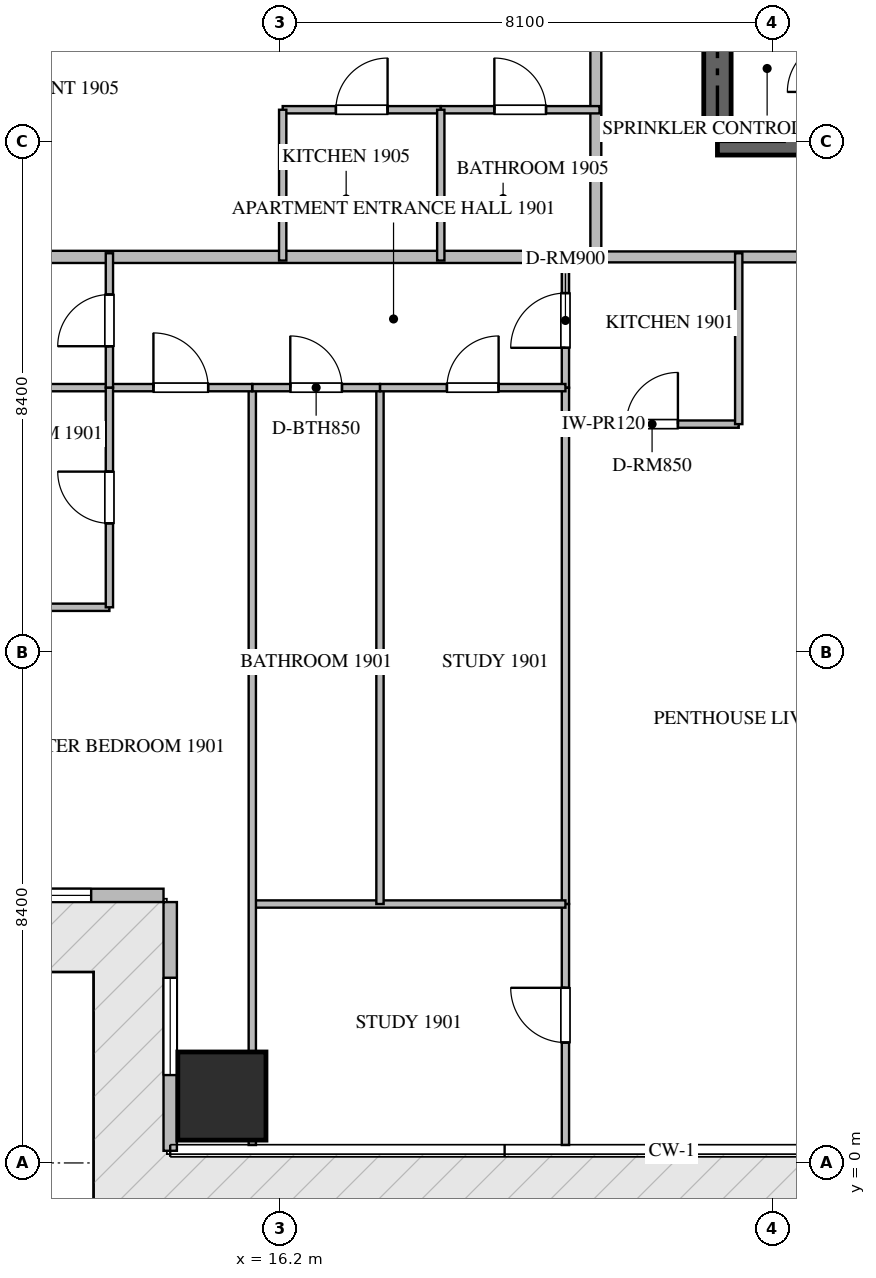
"""IFC4 building model, lengths in metres.
Left out: names, types, materials, properties, quantities, classifications, styles, units other than length and angle.
Written with IfcOpenShell. Run it as: python <this file> out.ifc"""

import sys

from ifc_helpers import new_model, si_unit, direction, frame, frame_2d, origin, origin_2d, place, context, subcontext, project, spatial, rectangle, extrude, source, transform, mapped, element, fill, save


model = new_model("IFC4")
c1 = context("Model", 3, precision=1e-05, world=origin(), true_north=direction((0.0, 1.0)))
c2 = subcontext(c1, "Body", "Model", "MODEL_VIEW")
j1 = project(units=[si_unit("LENGTHUNIT", "METRE"), si_unit("PLANEANGLEUNIT", "RADIAN")], contexts=[c1])
p1 = place(None, origin())
s1 = spatial("IfcSite", under=j1, at=p1, CompositionType="ELEMENT")
p2 = place(p1, origin())
s2 = spatial("IfcBuilding", under=s1, at=p2, CompositionType="ELEMENT")
p3 = place(p2, frame((0.0, 0.0, 79.2)))
s3 = spatial("IfcBuildingStorey", under=s2, at=p3, CompositionType="ELEMENT", Elevation=79.2)
p4 = place(p3, frame((23.4, 16.8, -0.26), z_axis=(0.0, 0.0, 1.0), x_axis=(1.0, 0.0, 0.0)))
e1 = element("IfcWall", 1, at=p4, inside=s3, PredefinedType="SHEAR", context=c2, shape_type="SweptSolid", body=[
    extrude(rectangle(XDim=18.0, YDim=0.45, at=frame_2d((9.0, 0.0))), origin(), (0.0, 0.0, 1.0), 3.748),
])
p5 = place(p3, frame((23.4, 17.025, -0.26), z_axis=(0.0, 0.0, 1.0), x_axis=(0.0, 1.0, 0.0)))
e2 = element("IfcWall", 2, at=p5, inside=s3, PredefinedType="SHEAR", context=c2, shape_type="SweptSolid", body=[
    extrude(rectangle(XDim=4.825, YDim=0.45, at=frame_2d((2.413, 0.0))), origin(), (0.0, 0.0, 1.0), 3.748),
])
m1 = source(origin(), c2, "Body", "SweptSolid", [
    extrude(rectangle(XDim=1.45, YDim=1.45, at=origin_2d()), origin(), (0.0, 0.0, 1.0), 3.75),
])
p6 = place(p3, frame((15.25, 1.1, -0.26), z_axis=(0.0, 0.0, 1.0), x_axis=(1.0, 0.0, 0.0)))
e3 = element("IfcColumn", 3, at=p6, inside=s3, PredefinedType="COLUMN", context=c2, shape_type="MappedRepresentation", body=[
    mapped(m1, transform((0.0, 0.0, 0.0), scale=1.0)),
])
p7 = place(p3, frame((10.31, 4.4, 0.0), z_axis=(0.0, 0.0, 1.0), x_axis=(1.0, 0.0, 0.0)))
e4 = element("IfcWall", 4, at=p7, inside=s3, PredefinedType="ELEMENTEDWALL", context=c2, shape_type="SweptSolid", body=[
    extrude(rectangle(XDim=3.98, YDim=0.22, at=frame_2d((1.99, 0.0))), origin(), (0.0, 0.0, 1.0), 3.475),
])
p8 = place(p7, frame((1.19, 0.0, 0.65)))
e5 = element("IfcOpeningElement", 5, at=p8, cuts=e4, PredefinedType="OPENING", context=c2, shape_type="SweptSolid", body=[
    extrude(rectangle(XDim=1.6, YDim=2.1, at=frame_2d((0.8, 1.05))), frame((0.0, 0.12, 0.0), z_axis=(0.0, -1.0, 0.0), x_axis=(1.0, 0.0, 0.0)), (0.0, 0.0, 1.0), 0.24),
])
p9 = place(p3, frame((14.4, 4.29, 0.0), z_axis=(0.0, 0.0, 1.0), x_axis=(0.0, -1.0, 0.0)))
e6 = element("IfcWall", 6, at=p9, inside=s3, PredefinedType="ELEMENTEDWALL", context=c2, shape_type="SweptSolid", body=[
    extrude(rectangle(XDim=4.09, YDim=0.22, at=frame_2d((2.045, 0.0))), origin(), (0.0, 0.0, 1.0), 3.475),
])
p10 = place(p9, frame((1.245, 0.0, 0.65)))
e7 = element("IfcOpeningElement", 7, at=p10, cuts=e6, PredefinedType="OPENING", context=c2, shape_type="SweptSolid", body=[
    extrude(rectangle(XDim=1.6, YDim=2.1, at=frame_2d((0.8, 1.05))), frame((0.0, 0.12, 0.0), z_axis=(0.0, -1.0, 0.0), x_axis=(1.0, 0.0, 0.0)), (0.0, 0.0, 1.0), 0.24),
])
p11 = place(p3, frame((6.082, 14.9, 0.0), z_axis=(0.0, 0.0, 1.0), x_axis=(1.0, 0.0, 0.0)))
e8 = element("IfcWall", 8, at=p11, inside=s3, PredefinedType="PARTITIONING", context=c2, shape_type="SweptSolid", body=[
    extrude(rectangle(XDim=15.318, YDim=0.2, at=frame_2d((7.659, 0.0))), origin(), (0.0, 0.0, 1.0), 3.49),
])
p12 = place(p3, frame((21.402, 14.9, 0.0), z_axis=(0.0, 0.0, 1.0), x_axis=(1.0, 0.0, 0.0)))
e9 = element("IfcWall", 9, at=p12, inside=s3, PredefinedType="PARTITIONING", context=c2, shape_type="SweptSolid", body=[
    extrude(rectangle(XDim=21.996, YDim=0.18, at=frame_2d((10.998, 0.0))), origin(), (0.0, 0.0, 1.0), 3.49),
])
p13 = place(p12, frame((4.724, 0.0, 0.0)))
e10 = element("IfcOpeningElement", 10, at=p13, cuts=e9, PredefinedType="OPENING", context=c2, shape_type="SweptSolid", body=[
    extrude(rectangle(XDim=1.0, YDim=2.15, at=frame_2d((0.5, 1.075))), frame((0.0, 0.1, 0.0), z_axis=(0.0, -1.0, 0.0), x_axis=(1.0, 0.0, 0.0)), (0.0, 0.0, 1.0), 0.2),
])
p14 = place(p12, frame((10.498, 0.0, 0.0)))
e11 = element("IfcOpeningElement", 11, at=p14, cuts=e9, PredefinedType="OPENING", context=c2, shape_type="SweptSolid", body=[
    extrude(rectangle(XDim=1.0, YDim=2.15, at=frame_2d((0.5, 1.075))), frame((0.0, 0.1, 0.0), z_axis=(0.0, -1.0, 0.0), x_axis=(1.0, 0.0, 0.0)), (0.0, 0.0, 1.0), 0.2),
])
p15 = place(p3, frame((21.4, 14.9, 0.0), z_axis=(0.0, 0.0, 1.0), x_axis=(0.0, 1.0, 0.0)))
e12 = element("IfcWall", 12, at=p15, inside=s3, PredefinedType="PARTITIONING", context=c2, shape_type="SweptSolid", body=[
    extrude(rectangle(XDim=20.6, YDim=0.18, at=frame_2d((10.3, 0.0))), origin(), (0.0, 0.0, 1.0), 3.49),
])
p16 = place(p15, frame((3.469, 0.0, 0.0)))
e13 = element("IfcOpeningElement", 13, at=p16, cuts=e12, PredefinedType="OPENING", context=c2, shape_type="SweptSolid", body=[
    extrude(rectangle(XDim=1.0, YDim=2.15, at=frame_2d((0.5, 1.075))), frame((0.0, 0.1, 0.0), z_axis=(0.0, -1.0, 0.0), x_axis=(1.0, 0.0, 0.0)), (0.0, 0.0, 1.0), 0.2),
])
p17 = place(p15, frame((11.172, 0.0, 0.0)))
e14 = element("IfcOpeningElement", 14, at=p17, cuts=e12, PredefinedType="OPENING", context=c2, shape_type="SweptSolid", body=[
    extrude(rectangle(XDim=1.0, YDim=2.15, at=frame_2d((0.5, 1.075))), frame((0.0, 0.1, 0.0), z_axis=(0.0, -1.0, 0.0), x_axis=(1.0, 0.0, 0.0)), (0.0, 0.0, 1.0), 0.2),
])
p18 = place(p15, frame((17.92, 0.0, 0.0)))
e15 = element("IfcOpeningElement", 15, at=p18, cuts=e12, PredefinedType="OPENING", context=c2, shape_type="SweptSolid", body=[
    extrude(rectangle(XDim=1.0, YDim=2.15, at=frame_2d((0.5, 1.075))), frame((0.0, 0.1, 0.0), z_axis=(0.0, -1.0, 0.0), x_axis=(1.0, 0.0, 0.0)), (0.0, 0.0, 1.0), 0.2),
])
p19 = place(p3, frame((20.9, 12.15, 0.0), z_axis=(0.0, 0.0, 1.0), x_axis=(1.0, 0.0, 0.0)))
e16 = element("IfcWall", 16, at=p19, inside=s3, PredefinedType="PARTITIONING", context=c2, shape_type="SweptSolid", body=[
    extrude(rectangle(XDim=2.85, YDim=0.12, at=frame_2d((1.425, 0.0))), origin(), (0.0, 0.0, 1.0), 3.49),
])
p20 = place(p19, frame((1.0, 0.0, 0.0)))
e17 = element("IfcOpeningElement", 17, at=p20, cuts=e16, PredefinedType="OPENING", context=c2, shape_type="SweptSolid", body=[
    extrude(rectangle(XDim=0.85, YDim=2.1, at=frame_2d((0.425, 1.05))), frame((0.0, 0.07, 0.0), z_axis=(0.0, -1.0, 0.0), x_axis=(1.0, 0.0, 0.0)), (0.0, 0.0, 1.0), 0.14),
])
p21 = place(p3, frame((23.75, 12.15, 0.0), z_axis=(0.0, 0.0, 1.0), x_axis=(0.0, 1.0, 0.0)))
e18 = element("IfcWall", 18, at=p21, inside=s3, PredefinedType="PARTITIONING", context=c2, shape_type="SweptSolid", body=[
    extrude(rectangle(XDim=2.81, YDim=0.12, at=frame_2d((1.405, 0.0))), origin(), (0.0, 0.0, 1.0), 3.49),
])
p22 = place(p3, frame((20.9, 12.75, 0.0), z_axis=(0.0, 0.0, 1.0), x_axis=(0.0, 1.0, 0.0)))
e19 = element("IfcWall", 19, at=p22, inside=s3, PredefinedType="PARTITIONING", context=c2, shape_type="SweptSolid", body=[
    extrude(rectangle(XDim=2.21, YDim=0.12, at=frame_2d((1.105, 0.0))), origin(), (0.0, 0.0, 1.0), 3.49),
])
p23 = place(p22, frame((0.655, 0.0, 0.0)))
e20 = element("IfcOpeningElement", 20, at=p23, cuts=e19, PredefinedType="OPENING", context=c2, shape_type="SweptSolid", body=[
    extrude(rectangle(XDim=0.9, YDim=2.1, at=frame_2d((0.45, 1.05))), frame((0.0, 0.07, 0.0), z_axis=(0.0, -1.0, 0.0), x_axis=(1.0, 0.0, 0.0)), (0.0, 0.0, 1.0), 0.14),
])
p24 = place(p3, frame((20.9, 0.295, 0.0), z_axis=(0.0, 0.0, 1.0), x_axis=(0.0, 1.0, 0.0)))
e21 = element("IfcWall", 21, at=p24, inside=s3, PredefinedType="PARTITIONING", context=c2, shape_type="SweptSolid", body=[
    extrude(rectangle(XDim=3.963, YDim=0.12, at=frame_2d((1.981, 0.0))), origin(), (0.0, 0.0, 1.0), 3.49),
])
p25 = place(p24, frame((1.685, 0.0, 0.0)))
e22 = element("IfcOpeningElement", 22, at=p25, cuts=e21, PredefinedType="OPENING", context=c2, shape_type="SweptSolid", body=[
    extrude(rectangle(XDim=0.9, YDim=2.1, at=frame_2d((0.45, 1.05))), frame((0.0, 0.07, 0.0), z_axis=(0.0, -1.0, 0.0), x_axis=(1.0, 0.0, 0.0)), (0.0, 0.0, 1.0), 0.14),
])
p26 = place(p3, frame((20.9, 4.26, 0.0), z_axis=(0.0, 0.0, 1.0), x_axis=(0.0, 1.0, 0.0)))
e23 = element("IfcWall", 23, at=p26, inside=s3, PredefinedType="PARTITIONING", context=c2, shape_type="SweptSolid", body=[
    extrude(rectangle(XDim=8.488, YDim=0.12, at=frame_2d((4.244, 0.0))), origin(), (0.0, 0.0, 1.0), 3.49),
])
p27 = place(p3, frame((15.75, 4.258, 0.0), z_axis=(0.0, 0.0, 1.0), x_axis=(1.0, 0.0, 0.0)))
e24 = element("IfcWall", 24, at=p27, inside=s3, PredefinedType="PARTITIONING", context=c2, shape_type="SweptSolid", body=[
    extrude(rectangle(XDim=5.15, YDim=0.12, at=frame_2d((2.575, 0.0))), origin(), (0.0, 0.0, 1.0), 3.49),
])
p28 = place(p3, frame((15.75, 0.295, 0.0), z_axis=(0.0, 0.0, 1.0), x_axis=(0.0, 1.0, 0.0)))
e25 = element("IfcWall", 25, at=p28, inside=s3, PredefinedType="PARTITIONING", context=c2, shape_type="SweptSolid", body=[
    extrude(rectangle(XDim=12.455, YDim=0.12, at=frame_2d((6.228, 0.0))), origin(), (0.0, 0.0, 1.0), 3.49),
])
p29 = place(p3, frame((17.85, 4.258, 0.0), z_axis=(0.0, 0.0, 1.0), x_axis=(0.0, 1.0, 0.0)))
e26 = element("IfcWall", 26, at=p29, inside=s3, PredefinedType="PARTITIONING", context=c2, shape_type="SweptSolid", body=[
    extrude(rectangle(XDim=8.492, YDim=0.12, at=frame_2d((4.246, 0.0))), origin(), (0.0, 0.0, 1.0), 3.49),
])
p30 = place(p3, frame((15.75, 12.75, 0.0), z_axis=(0.0, 0.0, 1.0), x_axis=(1.0, 0.0, 0.0)))
e27 = element("IfcWall", 27, at=p30, inside=s3, PredefinedType="PARTITIONING", context=c2, shape_type="SweptSolid", body=[
    extrude(rectangle(XDim=2.1, YDim=0.12, at=frame_2d((1.05, 0.0))), origin(), (0.0, 0.0, 1.0), 3.49),
])
p31 = place(p30, frame((0.625, 0.0, 0.0)))
e28 = element("IfcOpeningElement", 28, at=p31, cuts=e27, PredefinedType="OPENING", context=c2, shape_type="SweptSolid", body=[
    extrude(rectangle(XDim=0.85, YDim=2.1, at=frame_2d((0.425, 1.05))), frame((0.0, 0.07, 0.0), z_axis=(0.0, -1.0, 0.0), x_axis=(1.0, 0.0, 0.0)), (0.0, 0.0, 1.0), 0.14),
])
p32 = place(p3, frame((17.852, 12.75, 0.0), z_axis=(0.0, 0.0, 1.0), x_axis=(1.0, 0.0, 0.0)))
e29 = element("IfcWall", 29, at=p32, inside=s3, PredefinedType="PARTITIONING", context=c2, shape_type="SweptSolid", body=[
    extrude(rectangle(XDim=3.048, YDim=0.12, at=frame_2d((1.524, 0.0))), origin(), (0.0, 0.0, 1.0), 3.49),
])
p33 = place(p32, frame((1.099, 0.0, 0.0)))
e30 = element("IfcOpeningElement", 30, at=p33, cuts=e29, PredefinedType="OPENING", context=c2, shape_type="SweptSolid", body=[
    extrude(rectangle(XDim=0.85, YDim=2.1, at=frame_2d((0.425, 1.05))), frame((0.0, 0.07, 0.0), z_axis=(0.0, -1.0, 0.0), x_axis=(1.0, 0.0, 0.0)), (0.0, 0.0, 1.0), 0.14),
])
p34 = place(p3, frame((13.4, 12.75, 0.0), z_axis=(0.0, 0.0, 1.0), x_axis=(1.0, 0.0, 0.0)))
e31 = element("IfcWall", 31, at=p34, inside=s3, PredefinedType="PARTITIONING", context=c2, shape_type="SweptSolid", body=[
    extrude(rectangle(XDim=2.348, YDim=0.12, at=frame_2d((1.174, 0.0))), origin(), (0.0, 0.0, 1.0), 3.49),
])
p35 = place(p34, frame((0.724, 0.0, 0.0)))
e32 = element("IfcOpeningElement", 32, at=p35, cuts=e31, PredefinedType="OPENING", context=c2, shape_type="SweptSolid", body=[
    extrude(rectangle(XDim=0.9, YDim=2.1, at=frame_2d((0.45, 1.05))), frame((0.0, 0.07, 0.0), z_axis=(0.0, -1.0, 0.0), x_axis=(1.0, 0.0, 0.0)), (0.0, 0.0, 1.0), 0.14),
])
p36 = place(p3, frame((9.7, 9.138, 0.0), z_axis=(0.0, 0.0, 1.0), x_axis=(1.0, 0.0, 0.0)))
e33 = element("IfcWall", 33, at=p36, inside=s3, PredefinedType="PARTITIONING", context=c2, shape_type="SweptSolid", body=[
    extrude(rectangle(XDim=3.7, YDim=0.12, at=frame_2d((1.85, 0.0))), origin(), (0.0, 0.0, 1.0), 3.49),
])
p37 = place(p3, frame((9.7, 12.75, 0.0), z_axis=(0.0, 0.0, 1.0), x_axis=(1.0, 0.0, 0.0)))
e34 = element("IfcWall", 34, at=p37, inside=s3, PredefinedType="PARTITIONING", context=c2, shape_type="SweptSolid", body=[
    extrude(rectangle(XDim=3.698, YDim=0.12, at=frame_2d((1.849, 0.0))), origin(), (0.0, 0.0, 1.0), 3.49),
])
p38 = place(p3, frame((13.4, 9.138, 0.0), z_axis=(0.0, 0.0, 1.0), x_axis=(0.0, 1.0, 0.0)))
e35 = element("IfcWall", 35, at=p38, inside=s3, PredefinedType="PARTITIONING", context=c2, shape_type="SweptSolid", body=[
    extrude(rectangle(XDim=3.612, YDim=0.12, at=frame_2d((1.806, 0.0))), origin(), (0.0, 0.0, 1.0), 3.49),
])
p39 = place(p38, frame((1.381, 0.0, 0.0)))
e36 = element("IfcOpeningElement", 36, at=p39, cuts=e35, PredefinedType="OPENING", context=c2, shape_type="SweptSolid", body=[
    extrude(rectangle(XDim=0.85, YDim=2.1, at=frame_2d((0.425, 1.05))), frame((0.0, 0.07, 0.0), z_axis=(0.0, -1.0, 0.0), x_axis=(1.0, 0.0, 0.0)), (0.0, 0.0, 1.0), 0.14),
])
p40 = place(p3, frame((13.4, 12.752, 0.0), z_axis=(0.0, 0.0, 1.0), x_axis=(0.0, 1.0, 0.0)))
e37 = element("IfcWall", 37, at=p40, inside=s3, PredefinedType="PARTITIONING", context=c2, shape_type="SweptSolid", body=[
    extrude(rectangle(XDim=2.208, YDim=0.12, at=frame_2d((1.104, 0.0))), origin(), (0.0, 0.0, 1.0), 3.49),
])
p41 = place(p40, frame((0.679, 0.0, 0.0)))
e38 = element("IfcOpeningElement", 38, at=p41, cuts=e37, PredefinedType="OPENING", context=c2, shape_type="SweptSolid", body=[
    extrude(rectangle(XDim=0.85, YDim=2.1, at=frame_2d((0.425, 1.05))), frame((0.0, 0.07, 0.0), z_axis=(0.0, -1.0, 0.0), x_axis=(1.0, 0.0, 0.0)), (0.0, 0.0, 1.0), 0.14),
])
p42 = place(p3, frame((16.25, 17.32, 0.0), z_axis=(0.0, 0.0, 1.0), x_axis=(1.0, 0.0, 0.0)))
e39 = element("IfcWall", 39, at=p42, inside=s3, PredefinedType="PARTITIONING", context=c2, shape_type="SweptSolid", body=[
    extrude(rectangle(XDim=2.6, YDim=0.12, at=frame_2d((1.3, 0.0))), origin(), (0.0, 0.0, 1.0), 3.49),
])
p43 = place(p42, frame((0.875, 0.0, 0.0)))
e40 = element("IfcOpeningElement", 40, at=p43, cuts=e39, PredefinedType="OPENING", context=c2, shape_type="SweptSolid", body=[
    extrude(rectangle(XDim=0.85, YDim=2.1, at=frame_2d((0.425, 1.05))), frame((0.0, 0.07, 0.0), z_axis=(0.0, -1.0, 0.0), x_axis=(1.0, 0.0, 0.0)), (0.0, 0.0, 1.0), 0.14),
])
p44 = place(p3, frame((18.852, 17.32, 0.0), z_axis=(0.0, 0.0, 1.0), x_axis=(1.0, 0.0, 0.0)))
e41 = element("IfcWall", 41, at=p44, inside=s3, PredefinedType="PARTITIONING", context=c2, shape_type="SweptSolid", body=[
    extrude(rectangle(XDim=2.608, YDim=0.12, at=frame_2d((1.304, 0.0))), origin(), (0.0, 0.0, 1.0), 3.49),
])
p45 = place(p44, frame((0.879, 0.0, 0.0)))
e42 = element("IfcOpeningElement", 42, at=p45, cuts=e41, PredefinedType="OPENING", context=c2, shape_type="SweptSolid", body=[
    extrude(rectangle(XDim=0.85, YDim=2.1, at=frame_2d((0.425, 1.05))), frame((0.0, 0.07, 0.0), z_axis=(0.0, -1.0, 0.0), x_axis=(1.0, 0.0, 0.0)), (0.0, 0.0, 1.0), 0.14),
])
for number, where, z_axis, x_axis in (
    (43, (18.85, 14.84, 0.0), (0.0, 0.0, 1.0), (0.0, 1.0, 0.0)),
    (44, (16.25, 14.84, 0.0), (0.0, 0.0, 1.0), (0.0, 1.0, 0.0)),
):
    element("IfcWall", number, at=place(p3, frame(where, z_axis=z_axis, x_axis=x_axis)), inside=s3, PredefinedType="PARTITIONING", context=c2, shape_type="SweptSolid", body=[
        extrude(rectangle(XDim=2.48, YDim=0.12, at=frame_2d((1.24, 0.0))), origin(), (0.0, 0.0, 1.0), 3.49),
    ])
m2 = source(origin(), c2, "Body", "SweptSolid", [
    extrude(rectangle(XDim=1.6, YDim=2.1, at=frame_2d((0.8, 1.05))), frame((0.0, 0.03, 0.0), z_axis=(0.0, -1.0, 0.0), x_axis=(1.0, 0.0, 0.0)), (0.0, 0.0, 1.0), 0.06),
])
p46 = place(p8, origin())
e45 = element("IfcWindow", 45, at=p46, inside=s3, PartitioningType="SINGLE_PANEL", PredefinedType="WINDOW", context=c2, shape_type="MappedRepresentation", body=[
    mapped(m2, transform((0.0, 0.0, 0.0), scale=1.0)),
])
fill(e5, e45)
p47 = place(p10, origin())
e46 = element("IfcWindow", 46, at=p47, inside=s3, PartitioningType="SINGLE_PANEL", PredefinedType="WINDOW", context=c2, shape_type="MappedRepresentation", body=[
    mapped(m2, transform((0.0, 0.0, 0.0), scale=1.0)),
])
fill(e7, e46)
m3 = source(origin(), c2, "Body", "SweptSolid", [
    extrude(rectangle(XDim=0.85, YDim=2.1, at=frame_2d((0.425, 1.05))), frame((0.0, 0.025, 0.0), z_axis=(0.0, -1.0, 0.0), x_axis=(1.0, 0.0, 0.0)), (0.0, 0.0, 1.0), 0.05),
])
p48 = place(p20, origin())
e47 = element("IfcDoor", 47, at=p48, inside=s3, OperationType="SINGLE_SWING_RIGHT", PredefinedType="DOOR", context=c2, shape_type="MappedRepresentation", body=[
    mapped(m3, transform((0.0, 0.0, 0.0), scale=1.0)),
])
fill(e17, e47)
m4 = source(origin(), c2, "Body", "SweptSolid", [
    extrude(rectangle(XDim=0.9, YDim=2.1, at=frame_2d((0.45, 1.05))), frame((0.0, 0.025, 0.0), z_axis=(0.0, -1.0, 0.0), x_axis=(1.0, 0.0, 0.0)), (0.0, 0.0, 1.0), 0.05),
])
p49 = place(p23, origin())
e48 = element("IfcDoor", 48, at=p49, inside=s3, OperationType="SINGLE_SWING_LEFT", PredefinedType="DOOR", context=c2, shape_type="MappedRepresentation", body=[
    mapped(m4, transform((0.0, 0.0, 0.0), scale=1.0)),
])
fill(e20, e48)
p50 = place(p25, origin())
e49 = element("IfcDoor", 49, at=p50, inside=s3, OperationType="SINGLE_SWING_RIGHT", PredefinedType="DOOR", context=c2, shape_type="MappedRepresentation", body=[
    mapped(m4, transform((0.0, 0.0, 0.0), scale=1.0)),
])
fill(e22, e49)
p51 = place(p31, origin())
e50 = element("IfcDoor", 50, at=p51, inside=s3, OperationType="SINGLE_SWING_LEFT", PredefinedType="DOOR", context=c2, shape_type="MappedRepresentation", body=[
    mapped(m3, transform((0.0, 0.0, 0.0), scale=1.0)),
])
fill(e28, e50)
p52 = place(p33, origin())
e51 = element("IfcDoor", 51, at=p52, inside=s3, OperationType="SINGLE_SWING_RIGHT", PredefinedType="DOOR", context=c2, shape_type="MappedRepresentation", body=[
    mapped(m3, transform((0.0, 0.0, 0.0), scale=1.0)),
])
fill(e30, e51)
p53 = place(p35, origin())
e52 = element("IfcDoor", 52, at=p53, inside=s3, OperationType="SINGLE_SWING_LEFT", PredefinedType="DOOR", context=c2, shape_type="MappedRepresentation", body=[
    mapped(m4, transform((0.0, 0.0, 0.0), scale=1.0)),
])
fill(e32, e52)
p54 = place(p39, origin())
e53 = element("IfcDoor", 53, at=p54, inside=s3, OperationType="SINGLE_SWING_RIGHT", PredefinedType="DOOR", context=c2, shape_type="MappedRepresentation", body=[
    mapped(m3, transform((0.0, 0.0, 0.0), scale=1.0)),
])
fill(e36, e53)
p55 = place(p41, origin())
e54 = element("IfcDoor", 54, at=p55, inside=s3, OperationType="SINGLE_SWING_LEFT", PredefinedType="DOOR", context=c2, shape_type="MappedRepresentation", body=[
    mapped(m3, transform((0.0, 0.0, 0.0), scale=1.0)),
])
fill(e38, e54)
p56 = place(p43, origin())
e55 = element("IfcDoor", 55, at=p56, inside=s3, OperationType="SINGLE_SWING_RIGHT", PredefinedType="DOOR", context=c2, shape_type="MappedRepresentation", body=[
    mapped(m3, transform((0.0, 0.0, 0.0), scale=1.0)),
])
fill(e40, e55)
p57 = place(p45, origin())
e56 = element("IfcDoor", 56, at=p57, inside=s3, OperationType="SINGLE_SWING_LEFT", PredefinedType="DOOR", context=c2, shape_type="MappedRepresentation", body=[
    mapped(m3, transform((0.0, 0.0, 0.0), scale=1.0)),
])
fill(e42, e56)
save(model, sys.argv[1])
